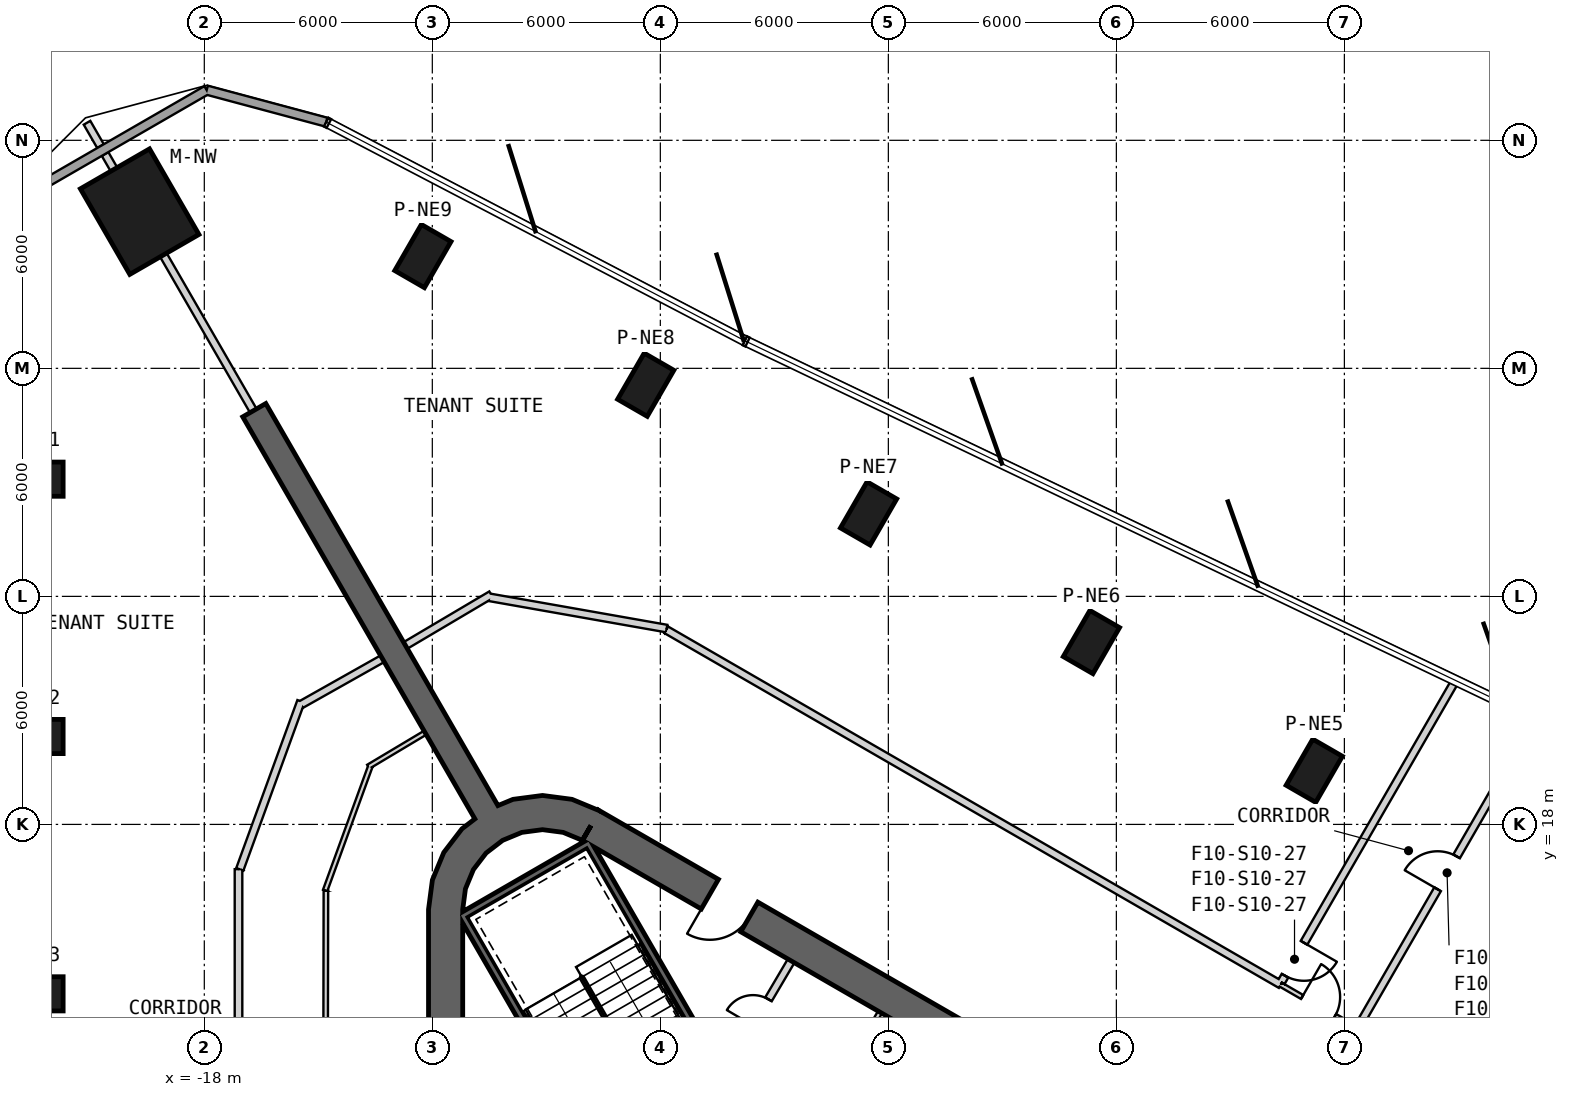
"""IFC4 building model, lengths in metres.
Left out: names, types, materials, properties, quantities, classifications, styles, units other than length and angle.
Written with IfcOpenShell. Run it as: python <this file> out.ifc"""

import sys

from ifc_helpers import new_model, si_unit, direction, frame, frame_2d, origin, origin_2d, place, context, subcontext, project, spatial, polyline, rectangle, outline, extrude, element, fill, save


model = new_model("IFC4")
c1 = context("Model", 3, precision=1e-05, world=origin(), true_north=direction((0.0, 1.0)))
c2 = subcontext(c1, "Body", "Model", "MODEL_VIEW")
j1 = project(units=[si_unit("LENGTHUNIT", "METRE"), si_unit("PLANEANGLEUNIT", "RADIAN")], contexts=[c1])
p1 = place(None, origin())
s1 = spatial("IfcSite", under=j1, at=p1, CompositionType="ELEMENT")
p2 = place(p1, origin())
s2 = spatial("IfcBuilding", under=s1, at=p2, CompositionType="ELEMENT")
p3 = place(p2, frame((0.0, 0.0, 181.2)))
s3 = spatial("IfcBuildingStorey", under=s2, at=p3, CompositionType="ELEMENT", Elevation=181.2)
p4 = place(p3, frame((-19.701, 34.124, 0.0), z_axis=(0.0, 0.0, 1.0), x_axis=(-0.5, 0.866025403784, 0.0)))
e1 = element("IfcColumn", 1, at=p4, inside=s3, PredefinedType="COLUMN", context=c2, shape_type="SweptSolid", body=[
    extrude(rectangle(XDim=2.6, YDim=2.1, at=origin_2d()), origin(), (0.0, 0.0, 1.0), 4.0),
])
for number, where, z_axis, x_axis in (
    (2, (-22.415, 27.084, 0.0), (0.0, 0.0, 1.0), (-1.0, 0.0, 0.0)),
    (3, (-22.415, 20.313, 0.0), (0.0, 0.0, 1.0), (-1.0, 0.0, 0.0)),
    (4, (-22.415, 13.542, 0.0), (0.0, 0.0, 1.0), (-1.0, 0.0, 0.0)),
    (5, (11.207, 19.412, 0.0), (0.0, 0.0, 1.0), (0.5, 0.866, 0.0)),
    (6, (5.344, 22.797, 0.0), (0.0, 0.0, 1.0), (0.5, 0.866, 0.0)),
    (7, (-0.52, 26.183, 0.0), (0.0, 0.0, 1.0), (0.5, 0.866, 0.0)),
    (8, (-6.384, 29.568, 0.0), (0.0, 0.0, 1.0), (0.5, 0.866, 0.0)),
    (9, (-12.248, 32.954, 0.0), (0.0, 0.0, 1.0), (0.5, 0.866, 0.0)),
):
    element("IfcColumn", number, at=place(p3, frame(where, z_axis=z_axis, x_axis=x_axis)), inside=s3, PredefinedType="COLUMN", context=c2, shape_type="SweptSolid", body=[
        extrude(rectangle(XDim=1.4, YDim=0.9, at=origin_2d()), origin(), (0.0, 0.0, 1.0), 4.0),
    ])
p5 = place(p3, frame((19.475, 2.208, 0.0), z_axis=(0.0, 0.0, 1.0), x_axis=(-0.866028369851, 0.499994862586, 0.0)))
e10 = element("IfcWall", 10, at=p5, inside=s3, PredefinedType="SHEAR", context=c2, shape_type="SweptSolid", body=[
    extrude(rectangle(XDim=31.523, YDim=0.9, at=frame_2d((15.762, 0.0))), origin(), (0.0, 0.0, 1.0), 4.0),
])
p6 = place(p5, frame((7.062, 0.0, 0.0)))
e11 = element("IfcOpeningElement", 11, at=p6, cuts=e10, PredefinedType="OPENING", context=c2, shape_type="SweptSolid", body=[
    extrude(rectangle(XDim=1.2, YDim=2.4, at=frame_2d((0.6, 1.2))), frame((0.0, 0.46, 0.0), z_axis=(0.0, -1.0, 0.0), x_axis=(1.0, 0.0, 0.0)), (0.0, 0.0, 1.0), 0.92),
])
p7 = place(p5, frame((3.612, 0.0, 0.0)))
e12 = element("IfcOpeningElement", 12, at=p7, cuts=e10, PredefinedType="OPENING", context=c2, shape_type="SweptSolid", body=[
    extrude(rectangle(XDim=1.2, YDim=2.4, at=frame_2d((0.6, 1.2))), frame((0.0, 0.46, 0.0), z_axis=(0.0, -1.0, 0.0), x_axis=(1.0, 0.0, 0.0)), (0.0, 0.0, 1.0), 0.92),
])
p8 = place(p5, frame((26.712, 0.0, 0.0)))
e13 = element("IfcOpeningElement", 13, at=p8, cuts=e10, PredefinedType="OPENING", context=c2, shape_type="SweptSolid", body=[
    extrude(rectangle(XDim=1.2, YDim=2.4, at=frame_2d((0.6, 1.2))), frame((0.0, 0.46, 0.0), z_axis=(0.0, -1.0, 0.0), x_axis=(1.0, 0.0, 0.0)), (0.0, 0.0, 1.0), 0.92),
])
p9 = place(p3, frame((-11.65, 15.762, 0.0), z_axis=(0.0, 0.0, 1.0), x_axis=(0.0, -1.0, 0.0)))
e14 = element("IfcWall", 14, at=p9, inside=s3, PredefinedType="SHEAR", context=c2, shape_type="SweptSolid", body=[
    extrude(rectangle(XDim=31.523, YDim=0.9, at=frame_2d((15.762, 0.0))), origin(), (0.0, 0.0, 1.0), 4.0),
])
p10 = place(p9, frame((7.062, 0.0, 0.0)))
e15 = element("IfcOpeningElement", 15, at=p10, cuts=e14, PredefinedType="OPENING", context=c2, shape_type="SweptSolid", body=[
    extrude(rectangle(XDim=1.2, YDim=2.4, at=frame_2d((0.6, 1.2))), frame((0.0, 0.46, 0.0), z_axis=(0.0, -1.0, 0.0), x_axis=(1.0, 0.0, 0.0)), (0.0, 0.0, 1.0), 0.92),
])
p11 = place(p9, frame((9.762, 0.0, 0.0)))
e16 = element("IfcOpeningElement", 16, at=p11, cuts=e14, PredefinedType="OPENING", context=c2, shape_type="SweptSolid", body=[
    extrude(rectangle(XDim=1.2, YDim=2.4, at=frame_2d((0.6, 1.2))), frame((0.0, 0.46, 0.0), z_axis=(0.0, -1.0, 0.0), x_axis=(1.0, 0.0, 0.0)), (0.0, 0.0, 1.0), 0.92),
])
p12 = place(p9, frame((12.462, 0.0, 0.0)))
e17 = element("IfcOpeningElement", 17, at=p12, cuts=e14, PredefinedType="OPENING", context=c2, shape_type="SweptSolid", body=[
    extrude(rectangle(XDim=1.2, YDim=2.4, at=frame_2d((0.6, 1.2))), frame((0.0, 0.46, 0.0), z_axis=(0.0, -1.0, 0.0), x_axis=(1.0, 0.0, 0.0)), (0.0, 0.0, 1.0), 0.92),
])
p13 = place(p9, frame((15.162, 0.0, 0.0)))
e18 = element("IfcOpeningElement", 18, at=p13, cuts=e14, PredefinedType="OPENING", context=c2, shape_type="SweptSolid", body=[
    extrude(rectangle(XDim=1.2, YDim=2.4, at=frame_2d((0.6, 1.2))), frame((0.0, 0.46, 0.0), z_axis=(0.0, -1.0, 0.0), x_axis=(1.0, 0.0, 0.0)), (0.0, 0.0, 1.0), 0.92),
])
p14 = place(p9, frame((17.862, 0.0, 0.0)))
e19 = element("IfcOpeningElement", 19, at=p14, cuts=e14, PredefinedType="OPENING", context=c2, shape_type="SweptSolid", body=[
    extrude(rectangle(XDim=1.2, YDim=2.4, at=frame_2d((0.6, 1.2))), frame((0.0, 0.46, 0.0), z_axis=(0.0, -1.0, 0.0), x_axis=(1.0, 0.0, 0.0)), (0.0, 0.0, 1.0), 0.92),
])
p15 = place(p9, frame((20.562, 0.0, 0.0)))
e20 = element("IfcOpeningElement", 20, at=p15, cuts=e14, PredefinedType="OPENING", context=c2, shape_type="SweptSolid", body=[
    extrude(rectangle(XDim=1.2, YDim=2.4, at=frame_2d((0.6, 1.2))), frame((0.0, 0.46, 0.0), z_axis=(0.0, -1.0, 0.0), x_axis=(1.0, 0.0, 0.0)), (0.0, 0.0, 1.0), 0.92),
])
p16 = place(p9, frame((23.262, 0.0, 0.0)))
e21 = element("IfcOpeningElement", 21, at=p16, cuts=e14, PredefinedType="OPENING", context=c2, shape_type="SweptSolid", body=[
    extrude(rectangle(XDim=1.2, YDim=2.4, at=frame_2d((0.6, 1.2))), frame((0.0, 0.46, 0.0), z_axis=(0.0, -1.0, 0.0), x_axis=(1.0, 0.0, 0.0)), (0.0, 0.0, 1.0), 0.92),
])
p17 = place(p9, frame((3.612, 0.0, 0.0)))
e22 = element("IfcOpeningElement", 22, at=p17, cuts=e14, PredefinedType="OPENING", context=c2, shape_type="SweptSolid", body=[
    extrude(rectangle(XDim=1.2, YDim=2.4, at=frame_2d((0.6, 1.2))), frame((0.0, 0.46, 0.0), z_axis=(0.0, -1.0, 0.0), x_axis=(1.0, 0.0, 0.0)), (0.0, 0.0, 1.0), 0.92),
])
p18 = place(p9, frame((26.712, 0.0, 0.0)))
e23 = element("IfcOpeningElement", 23, at=p18, cuts=e14, PredefinedType="OPENING", context=c2, shape_type="SweptSolid", body=[
    extrude(rectangle(XDim=1.2, YDim=2.4, at=frame_2d((0.6, 1.2))), frame((0.0, 0.46, 0.0), z_axis=(0.0, -1.0, 0.0), x_axis=(1.0, 0.0, 0.0)), (0.0, 0.0, 1.0), 0.92),
])
p19 = place(p3, origin())
e24 = element("IfcWall", 24, at=p19, inside=s3, PredefinedType="SHEAR", context=c2, shape_type="SweptSolid", body=[
    extrude(outline(polyline([(-7.6, 18.36), (-8.323, 18.659), (-9.1, 18.762), (-9.876, 18.659), (-10.6, 18.36), (-11.221, 17.883), (-11.698, 17.262), (-11.998, 16.538), (-12.1, 15.762), (-11.2, 15.762), (-11.128, 16.305), (-10.919, 16.812), (-10.585, 17.247), (-10.15, 17.58), (-9.644, 17.79), (-9.1, 17.862), (-8.556, 17.79), (-8.05, 17.58), (-7.6, 18.36)])), origin(), (0.0, 0.0, 1.0), 4.0),
])
p20 = place(p3, frame((-10.575, 18.316, 0.0), z_axis=(0.0, 0.0, 1.0), x_axis=(-0.500002625756, 0.866023887798, 0.0)))
e25 = element("IfcWall", 25, at=p20, inside=s3, PredefinedType="SHEAR", context=c2, shape_type="SweptSolid", body=[
    extrude(rectangle(XDim=12.22, YDim=0.7, at=frame_2d((6.11, 0.0))), origin(), (0.0, 0.0, 1.0), 4.0),
])
p21 = place(p3, frame((-14.793, 36.479, 0.0), z_axis=(0.0, 0.0, 1.0), x_axis=(-0.965934328549, 0.258787312151, 0.0)))
e26 = element("IfcWall", 26, at=p21, inside=s3, PredefinedType="SOLIDWALL", context=c2, shape_type="SweptSolid", body=[
    extrude(rectangle(XDim=3.256, YDim=0.24, at=frame_2d((1.628, 0.0))), origin(), (0.0, 0.0, 1.0), 3.7),
])
p22 = place(p3, frame((-17.938, 37.322, 0.0), z_axis=(0.0, 0.0, 1.0), x_axis=(-0.866019130722, -0.500010865105, 0.0)))
e27 = element("IfcWall", 27, at=p22, inside=s3, PredefinedType="SOLIDWALL", context=c2, shape_type="SweptSolid", body=[
    extrude(rectangle(XDim=6.253, YDim=0.24, at=frame_2d((3.126, 0.0))), origin(), (0.0, 0.0, 1.0), 3.7),
])
p23 = place(p3, frame((-11.245, 15.678, -0.3), z_axis=(0.0, 0.0, 1.0), x_axis=(0.499977274689, -0.866038523851, 0.0)))
e28 = element("IfcWall", 28, at=p23, inside=s3, PredefinedType="SHEAR", context=c2, shape_type="SweptSolid", body=[
    extrude(rectangle(XDim=8.1, YDim=0.2, at=frame_2d((4.05, 0.0))), origin(), (0.0, 0.0, 1.0), 4.0),
])
p24 = place(p3, frame((-7.818, 17.541, -0.3), z_axis=(0.0, 0.0, 1.0), x_axis=(-0.866044365799, -0.499967155389, 0.0)))
e29 = element("IfcWall", 29, at=p24, inside=s3, PredefinedType="SHEAR", context=c2, shape_type="SweptSolid", body=[
    extrude(rectangle(XDim=3.8, YDim=0.2, at=frame_2d((1.9, 0.0))), origin(), (0.0, 0.0, 1.0), 4.0),
])
p25 = place(p3, frame((-7.854, 17.405, -0.3), z_axis=(0.0, 0.0, 1.0), x_axis=(0.499997992926, -0.866026562566, 0.0)))
e30 = element("IfcWall", 30, at=p25, inside=s3, PredefinedType="SHEAR", context=c2, shape_type="SweptSolid", body=[
    extrude(rectangle(XDim=7.9, YDim=0.2, at=frame_2d((3.95, 0.0))), origin(), (0.0, 0.0, 1.0), 4.0),
])
p26 = place(p3, frame((-0.22, 13.06, 0.0), z_axis=(0.0, 0.0, 1.0), x_axis=(-0.499984717929, -0.866034226713, 0.0)))
e31 = element("IfcWall", 31, at=p26, inside=s3, PredefinedType="PARTITIONING", context=c2, shape_type="SweptSolid", body=[
    extrude(rectangle(XDim=3.25, YDim=0.12, at=frame_2d((1.625, 0.0))), origin(), (0.0, 0.0, 1.0), 3.7),
])
p27 = place(p26, frame((1.125, 0.0, 0.0)))
e32 = element("IfcOpeningElement", 32, at=p27, cuts=e31, PredefinedType="OPENING", context=c2, shape_type="SweptSolid", body=[
    extrude(rectangle(XDim=1.0, YDim=2.1, at=frame_2d((0.5, 1.05))), frame((0.0, 0.07, 0.0), z_axis=(0.0, -1.0, 0.0), x_axis=(1.0, 0.0, 0.0)), (0.0, 0.0, 1.0), 0.14),
])
p28 = place(p3, frame((-2.558, 14.409, 0.0), z_axis=(0.0, 0.0, 1.0), x_axis=(-0.508018930956, -0.861345903683, 0.0)))
e33 = element("IfcWall", 33, at=p28, inside=s3, PredefinedType="PARTITIONING", context=c2, shape_type="SweptSolid", body=[
    extrude(rectangle(XDim=3.15, YDim=0.2, at=frame_2d((1.575, 0.0))), origin(), (0.0, 0.0, 1.0), 3.7),
])
p29 = place(p28, frame((1.175, 0.0, 0.0)))
e34 = element("IfcOpeningElement", 34, at=p29, cuts=e33, PredefinedType="OPENING", context=c2, shape_type="SweptSolid", body=[
    extrude(rectangle(XDim=0.8, YDim=2.1, at=frame_2d((0.4, 1.05))), frame((0.0, 0.11, 0.0), z_axis=(0.0, -1.0, 0.0), x_axis=(1.0, 0.0, 0.0)), (0.0, 0.0, 1.0), 0.22),
])
p30 = place(p3, frame((-12.189, 20.411, 0.0), z_axis=(0.0, 0.0, 1.0), x_axis=(-0.858492721014, -0.51282574815, 0.0)))
e35 = element("IfcWall", 35, at=p30, inside=s3, PredefinedType="PARTITIONING", context=c2, shape_type="SweptSolid", body=[
    extrude(rectangle(XDim=1.742, YDim=0.12, at=frame_2d((0.871, 0.0))), origin(), (0.0, 0.0, 1.0), 3.7),
])
p31 = place(p3, frame((-13.631, 19.53, 0.0), z_axis=(0.0, 0.0, 1.0), x_axis=(-0.342069878069, -0.939674517329, 0.0)))
e36 = element("IfcWall", 36, at=p31, inside=s3, PredefinedType="PARTITIONING", context=c2, shape_type="SweptSolid", body=[
    extrude(rectangle(XDim=3.479, YDim=0.12, at=frame_2d((1.739, 0.0))), origin(), (0.0, 0.0, 1.0), 2.78),
])
p32 = place(p3, frame((-14.8, 16.257, 0.0), z_axis=(0.0, 0.0, 1.0), x_axis=(-0.001847148781, -0.999998294019, 0.0)))
e37 = element("IfcWall", 37, at=p32, inside=s3, PredefinedType="PARTITIONING", context=c2, shape_type="SweptSolid", body=[
    extrude(rectangle(XDim=16.257, YDim=0.12, at=frame_2d((8.128, 0.0))), origin(), (0.0, 0.0, 1.0), 2.88),
])
p33 = place(p32, frame((7.629, 0.0, 0.0)))
e38 = element("IfcOpeningElement", 38, at=p33, cuts=e37, PredefinedType="OPENING", context=c2, shape_type="SweptSolid", body=[
    extrude(rectangle(XDim=1.0, YDim=2.1, at=frame_2d((0.5, 1.05))), frame((0.0, 0.07, 0.0), z_axis=(0.0, -1.0, 0.0), x_axis=(1.0, 0.0, 0.0)), (0.0, 0.0, 1.0), 0.14),
])
p34 = place(p3, frame((-17.1, 16.823, 0.0), z_axis=(0.0, 0.0, 1.0), x_axis=(0.0, -1.0, 0.0)))
e39 = element("IfcWall", 39, at=p34, inside=s3, PredefinedType="PARTITIONING", context=c2, shape_type="SweptSolid", body=[
    extrude(rectangle(XDim=12.473, YDim=0.2, at=frame_2d((6.236, 0.0))), origin(), (0.0, 0.0, 1.0), 2.88),
])
p35 = place(p34, frame((5.776, 0.0, 0.0)))
e40 = element("IfcOpeningElement", 40, at=p35, cuts=e39, PredefinedType="OPENING", context=c2, shape_type="SweptSolid", body=[
    extrude(rectangle(XDim=1.0, YDim=2.1, at=frame_2d((0.5, 1.05))), frame((0.0, 0.11, 0.0), z_axis=(0.0, -1.0, 0.0), x_axis=(1.0, 0.0, 0.0)), (0.0, 0.0, 1.0), 0.22),
])
p36 = place(p3, frame((-15.456, 21.239, 0.0), z_axis=(0.0, 0.0, 1.0), x_axis=(-0.34205546997, -0.939679762187, 0.0)))
e41 = element("IfcWall", 41, at=p36, inside=s3, PredefinedType="PARTITIONING", context=c2, shape_type="SweptSolid", body=[
    extrude(rectangle(XDim=4.706, YDim=0.2, at=frame_2d((2.353, 0.0))), origin(), (0.0, 0.0, 1.0), 2.78),
])
p37 = place(p3, frame((-13.313, 22.359, 0.0), z_axis=(0.0, 0.0, 1.0), x_axis=(-0.87121710687, -0.490897904555, 0.0)))
e42 = element("IfcWall", 42, at=p37, inside=s3, PredefinedType="PARTITIONING", context=c2, shape_type="SweptSolid", body=[
    extrude(rectangle(XDim=2.457, YDim=0.2, at=frame_2d((1.229, 0.0))), origin(), (0.0, 0.0, 1.0), 3.7),
])
p38 = place(p3, frame((10.325, 13.784, 0.0), z_axis=(0.0, 0.0, 1.0), x_axis=(0.86602648383, -0.499998129301, 0.0)))
e43 = element("IfcWall", 43, at=p38, inside=s3, PredefinedType="PARTITIONING", context=c2, shape_type="SweptSolid", body=[
    extrude(rectangle(XDim=2.3, YDim=0.12, at=frame_2d((1.15, 0.0))), origin(), (0.0, 0.0, 1.0), 3.7),
])
p39 = place(p38, frame((0.65, 0.0, 0.0)))
e44 = element("IfcOpeningElement", 44, at=p39, cuts=e43, PredefinedType="OPENING", context=c2, shape_type="SweptSolid", body=[
    extrude(rectangle(XDim=1.0, YDim=2.1, at=frame_2d((0.5, 1.05))), frame((0.0, 0.07, 0.0), z_axis=(0.0, -1.0, 0.0), x_axis=(1.0, 0.0, 0.0)), (0.0, 0.0, 1.0), 0.14),
])
p40 = place(p3, frame((-10.449, 24.044, 0.0), z_axis=(0.0, 0.0, 1.0), x_axis=(-0.860744847861, -0.509036645912, 0.0)))
e45 = element("IfcWall", 45, at=p40, inside=s3, PredefinedType="PARTITIONING", context=c2, shape_type="SweptSolid", body=[
    extrude(rectangle(XDim=2.623, YDim=0.2, at=frame_2d((1.311, 0.0))), origin(), (0.0, 0.0, 1.0), 3.7),
])
p41 = place(p3, frame((-5.834, 23.153, 0.0), z_axis=(0.0, 0.0, 1.0), x_axis=(-0.98481258102, 0.173620794447, 0.0)))
e46 = element("IfcWall", 46, at=p41, inside=s3, PredefinedType="PARTITIONING", context=c2, shape_type="SweptSolid", body=[
    extrude(rectangle(XDim=4.74, YDim=0.2, at=frame_2d((2.37, 0.0))), origin(), (0.0, 0.0, 1.0), 2.78),
])
p42 = place(p3, frame((10.325, 13.784, 0.0), z_axis=(0.0, 0.0, 1.0), x_axis=(-0.866025119466, 0.500000492453, 0.0)))
e47 = element("IfcWall", 47, at=p42, inside=s3, PredefinedType="PARTITIONING", context=c2, shape_type="SweptSolid", body=[
    extrude(rectangle(XDim=18.673, YDim=0.2, at=frame_2d((9.336, 0.0))), origin(), (0.0, 0.0, 1.0), 2.88),
])
p43 = place(p3, frame((-21.086, 36.462, 0.0), z_axis=(0.0, 0.0, 1.0), x_axis=(0.499801860585, -0.866139769411, 0.0)))
e48 = element("IfcWall", 48, at=p43, inside=s3, PredefinedType="PARTITIONING", context=c2, shape_type="SweptSolid", body=[
    extrude(rectangle(XDim=0.71, YDim=0.2, at=frame_2d((0.355, 0.0))), origin(), (0.0, 0.0, 1.0), 3.7),
])
p44 = place(p3, frame((-20.611, 35.64, 0.0), z_axis=(0.0, 0.0, 1.0), x_axis=(0.499842898591, -0.866116087328, 0.0)))
e49 = element("IfcWall", 49, at=p44, inside=s3, PredefinedType="PARTITIONING", context=c2, shape_type="SweptSolid", body=[
    extrude(rectangle(XDim=0.468, YDim=0.2, at=frame_2d((0.234, 0.0))), origin(), (0.0, 0.0, 1.0), 3.7),
])
p45 = place(p3, frame((-19.077, 32.983, 0.0), z_axis=(0.0, 0.0, 1.0), x_axis=(0.499978475836, -0.86603783041, 0.0)))
e50 = element("IfcWall", 50, at=p45, inside=s3, PredefinedType="PARTITIONING", context=c2, shape_type="SweptSolid", body=[
    extrude(rectangle(XDim=4.733, YDim=0.2, at=frame_2d((2.366, 0.0))), origin(), (0.0, 0.0, 1.0), 3.27),
])
p46 = place(p3, frame((14.924, 21.789, 0.0), z_axis=(0.0, 0.0, 1.0), x_axis=(-0.499989745068, -0.866031324391, 0.0)))
e51 = element("IfcWall", 51, at=p46, inside=s3, PredefinedType="PARTITIONING", context=c2, shape_type="SweptSolid", body=[
    extrude(rectangle(XDim=9.172, YDim=0.2, at=frame_2d((4.586, 0.0))), origin(), (0.0, 0.0, 1.0), 3.7),
])
p47 = place(p46, frame((7.972, 0.0, 0.0)))
e52 = element("IfcOpeningElement", 52, at=p47, cuts=e51, PredefinedType="OPENING", context=c2, shape_type="SweptSolid", body=[
    extrude(rectangle(XDim=1.0, YDim=2.1, at=frame_2d((0.5, 1.05))), frame((0.0, 0.11, 0.0), z_axis=(0.0, -1.0, 0.0), x_axis=(1.0, 0.0, 0.0)), (0.0, 0.0, 1.0), 0.22),
])
p48 = place(p3, frame((12.365, 12.676, 0.0), z_axis=(0.0, 0.0, 1.0), x_axis=(0.499998839552, 0.866026073768, 0.0)))
e53 = element("IfcWall", 53, at=p48, inside=s3, PredefinedType="PARTITIONING", context=c2, shape_type="SweptSolid", body=[
    extrude(rectangle(XDim=9.354, YDim=0.2, at=frame_2d((4.677, 0.0))), origin(), (0.0, 0.0, 1.0), 3.7),
])
p49 = place(p48, frame((4.177, 0.0, 0.0)))
e54 = element("IfcOpeningElement", 54, at=p49, cuts=e53, PredefinedType="OPENING", context=c2, shape_type="SweptSolid", body=[
    extrude(rectangle(XDim=1.0, YDim=2.1, at=frame_2d((0.5, 1.05))), frame((0.0, 0.11, 0.0), z_axis=(0.0, -1.0, 0.0), x_axis=(1.0, 0.0, 0.0)), (0.0, 0.0, 1.0), 0.22),
])
p50 = place(p29, origin())
e55 = element("IfcDoor", 55, at=p50, inside=s3, OperationType="SINGLE_SWING_RIGHT", PredefinedType="USERDEFINED", context=c2, shape_type="SweptSolid", body=[
    extrude(rectangle(XDim=0.8, YDim=2.1, at=frame_2d((0.4, 1.05))), frame((0.0, 0.025, 0.0), z_axis=(0.0, -1.0, 0.0), x_axis=(1.0, 0.0, 0.0)), (0.0, 0.0, 1.0), 0.05),
])
fill(e34, e55)
p51 = place(p39, origin())
e56 = element("IfcDoor", 56, at=p51, inside=s3, OperationType="SINGLE_SWING_RIGHT", PredefinedType="NOTDEFINED", context=c2, shape_type="SweptSolid", body=[
    extrude(rectangle(XDim=1.0, YDim=2.1, at=frame_2d((0.5, 1.05))), frame((0.0, 0.025, 0.0), z_axis=(0.0, -1.0, 0.0), x_axis=(1.0, 0.0, 0.0)), (0.0, 0.0, 1.0), 0.05),
])
fill(e44, e56)
p52 = place(p47, origin())
e57 = element("IfcDoor", 57, at=p52, inside=s3, OperationType="SINGLE_SWING_RIGHT", PredefinedType="USERDEFINED", context=c2, shape_type="SweptSolid", body=[
    extrude(rectangle(XDim=1.0, YDim=2.1, at=frame_2d((0.5, 1.05))), frame((0.0, 0.025, 0.0), z_axis=(0.0, -1.0, 0.0), x_axis=(1.0, 0.0, 0.0)), (0.0, 0.0, 1.0), 0.05),
])
fill(e52, e57)
p53 = place(p49, origin())
e58 = element("IfcDoor", 58, at=p53, inside=s3, OperationType="SINGLE_SWING_RIGHT", PredefinedType="USERDEFINED", context=c2, shape_type="SweptSolid", body=[
    extrude(rectangle(XDim=1.0, YDim=2.1, at=frame_2d((0.5, 1.05))), frame((0.0, 0.025, 0.0), z_axis=(0.0, -1.0, 0.0), x_axis=(1.0, 0.0, 0.0)), (0.0, 0.0, 1.0), 0.05),
])
fill(e54, e58)
p54 = place(p8, origin())
e59 = element("IfcDoor", 59, at=p54, inside=s3, OperationType="SINGLE_SWING_LEFT", PredefinedType="USERDEFINED", context=c2, shape_type="SweptSolid", body=[
    extrude(rectangle(XDim=1.2, YDim=2.4, at=frame_2d((0.6, 1.2))), frame((0.0, 0.025, 0.0), z_axis=(0.0, -1.0, 0.0), x_axis=(1.0, 0.0, 0.0)), (0.0, 0.0, 1.0), 0.05),
])
fill(e13, e59)
save(model, sys.argv[1])
